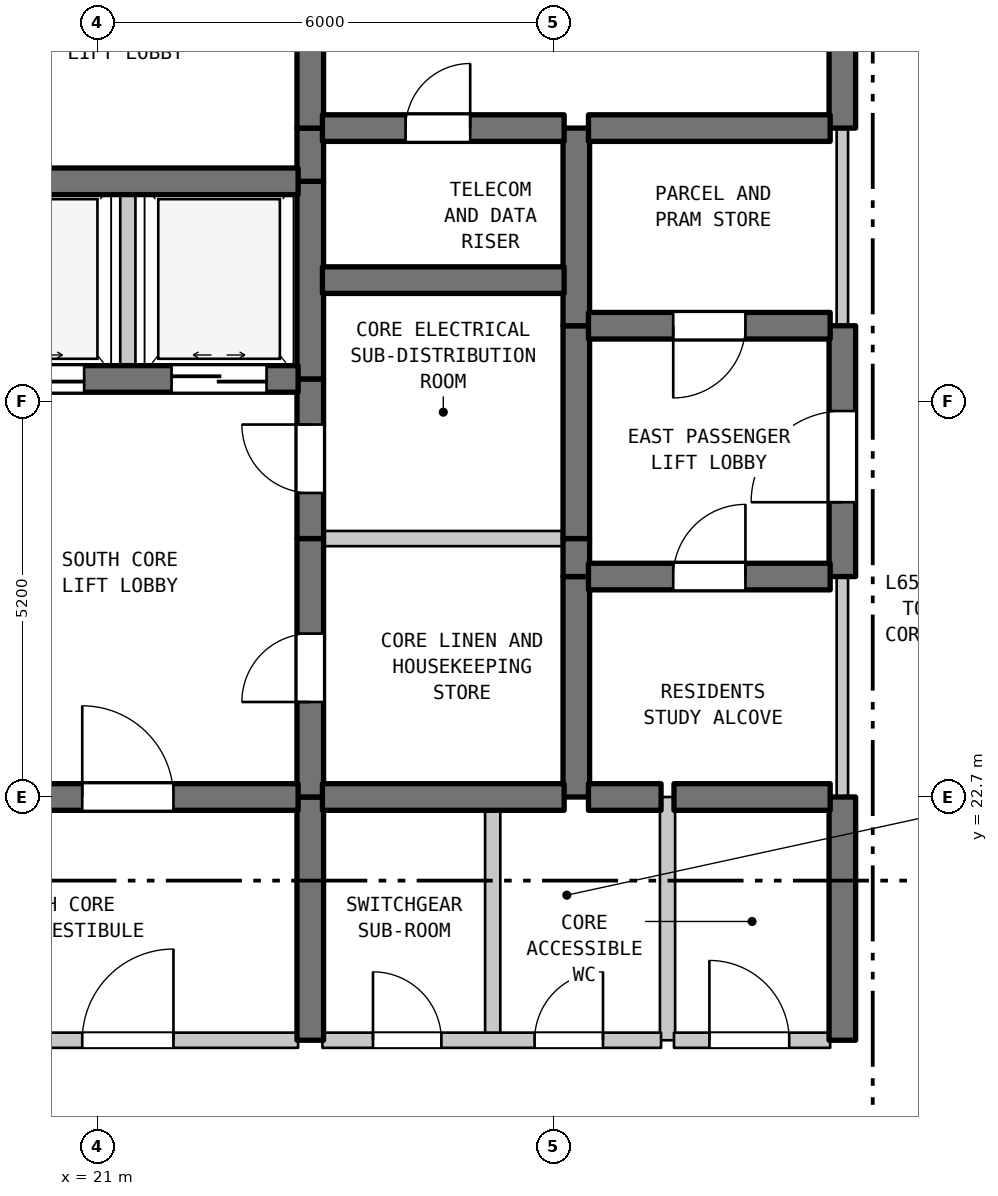
"""IFC4 building model, lengths in metres.
Left out: names, types, materials, properties, quantities, classifications, styles, units other than length and angle.
Written with IfcOpenShell. Run it as: python <this file> out.ifc"""

import sys

from ifc_helpers import new_model, si_unit, direction, frame, frame_2d, origin, place, context, subcontext, project, spatial, rectangle, extrude, element, fill, save


model = new_model("IFC4")
c1 = context("Model", 3, precision=1e-05, world=origin(), true_north=direction((0.0, 1.0)))
c2 = subcontext(c1, "Body", "Model", "MODEL_VIEW")
j1 = project(units=[si_unit("LENGTHUNIT", "METRE"), si_unit("PLANEANGLEUNIT", "RADIAN")], contexts=[c1])
p1 = place(None, origin())
s1 = spatial("IfcSite", under=j1, at=p1, CompositionType="ELEMENT")
p2 = place(p1, origin())
s2 = spatial("IfcBuilding", under=s1, at=p2, CompositionType="ELEMENT")
p3 = place(p2, frame((0.0, 0.0, 262.1)))
s3 = spatial("IfcBuildingStorey", under=s2, at=p3, CompositionType="ELEMENT", Elevation=262.1)
p4 = place(p3, frame((21.4, 28.2, 0.0), z_axis=(0.0, 0.0, 1.0), x_axis=(0.0, 1.0, 0.0)))
e1 = element("IfcWall", 1, at=p4, inside=s3, PredefinedType="STANDARD", context=c2, shape_type="SweptSolid", body=[
    extrude(rectangle(XDim=2.6, YDim=0.2, at=frame_2d((1.3, 0.0))), origin(), (0.0, 0.0, 1.0), 3.39),
])
p5 = place(p3, frame((23.8, 19.5, 0.0), z_axis=(0.0, 0.0, 1.0), x_axis=(0.0, 1.0, 0.0)))
e2 = element("IfcWall", 2, at=p5, inside=s3, PredefinedType="SHEAR", context=c2, shape_type="SweptSolid", body=[
    extrude(rectangle(XDim=3.2, YDim=0.35, at=frame_2d((1.6, 0.0))), origin(), (0.0, 0.0, 1.0), 3.39),
])
p6 = place(p3, frame((23.8, 22.7, 0.0), z_axis=(0.0, 0.0, 1.0), x_axis=(0.0, 1.0, 0.0)))
e3 = element("IfcWall", 3, at=p6, inside=s3, PredefinedType="SHEAR", context=c2, shape_type="SweptSolid", body=[
    extrude(rectangle(XDim=3.4, YDim=0.35, at=frame_2d((1.7, 0.0))), origin(), (0.0, 0.0, 1.0), 3.39),
])
p7 = place(p6, frame((1.25, 0.0, 0.0)))
e4 = element("IfcOpeningElement", 4, at=p7, cuts=e3, PredefinedType="OPENING", context=c2, shape_type="SweptSolid", body=[
    extrude(rectangle(XDim=0.9, YDim=2.15, at=frame_2d((0.45, 1.075))), frame((0.0, 0.185, 0.0), z_axis=(0.0, -1.0, 0.0), x_axis=(1.0, 0.0, 0.0)), (0.0, 0.0, 1.0), 0.37),
])
p8 = place(p3, frame((23.8, 26.1, 0.0), z_axis=(0.0, 0.0, 1.0), x_axis=(0.0, 1.0, 0.0)))
e5 = element("IfcWall", 5, at=p8, inside=s3, PredefinedType="SHEAR", context=c2, shape_type="SweptSolid", body=[
    extrude(rectangle(XDim=2.1, YDim=0.35, at=frame_2d((1.05, 0.0))), origin(), (0.0, 0.0, 1.0), 3.39),
])
p9 = place(p8, frame((0.6, 0.0, 0.0)))
e6 = element("IfcOpeningElement", 6, at=p9, cuts=e5, PredefinedType="OPENING", context=c2, shape_type="SweptSolid", body=[
    extrude(rectangle(XDim=0.9, YDim=2.15, at=frame_2d((0.45, 1.075))), frame((0.0, 0.185, 0.0), z_axis=(0.0, -1.0, 0.0), x_axis=(1.0, 0.0, 0.0)), (0.0, 0.0, 1.0), 0.37),
])
p10 = place(p3, frame((23.8, 28.2, 0.0), z_axis=(0.0, 0.0, 1.0), x_axis=(0.0, 1.0, 0.0)))
e7 = element("IfcWall", 7, at=p10, inside=s3, PredefinedType="SHEAR", context=c2, shape_type="SweptSolid", body=[
    extrude(rectangle(XDim=2.6, YDim=0.35, at=frame_2d((1.3, 0.0))), origin(), (0.0, 0.0, 1.0), 3.39),
])
p11 = place(p3, frame((23.8, 30.8, 0.0), z_axis=(0.0, 0.0, 1.0), x_axis=(0.0, 1.0, 0.0)))
e8 = element("IfcWall", 8, at=p11, inside=s3, PredefinedType="SHEAR", context=c2, shape_type="SweptSolid", body=[
    extrude(rectangle(XDim=0.7, YDim=0.35, at=frame_2d((0.35, 0.0))), origin(), (0.0, 0.0, 1.0), 3.39),
])
p12 = place(p3, frame((23.8, 31.5, 0.0), z_axis=(0.0, 0.0, 1.0), x_axis=(0.0, 1.0, 0.0)))
e9 = element("IfcWall", 9, at=p12, inside=s3, PredefinedType="SHEAR", context=c2, shape_type="SweptSolid", body=[
    extrude(rectangle(XDim=3.5, YDim=0.35, at=frame_2d((1.75, 0.0))), origin(), (0.0, 0.0, 1.0), 3.39),
])
p13 = place(p12, frame((1.127, 0.0, 0.0)))
e10 = element("IfcOpeningElement", 10, at=p13, cuts=e9, PredefinedType="OPENING", context=c2, shape_type="SweptSolid", body=[
    extrude(rectangle(XDim=1.1, YDim=2.15, at=frame_2d((0.55, 1.075))), frame((0.0, 0.185, 0.0), z_axis=(0.0, -1.0, 0.0), x_axis=(1.0, 0.0, 0.0)), (0.0, 0.0, 1.0), 0.37),
])
p14 = place(p3, frame((26.2, 19.5, 0.0), z_axis=(0.0, 0.0, 1.0), x_axis=(0.0, 1.0, 0.0)))
e11 = element("IfcWall", 11, at=p14, inside=s3, PredefinedType="STANDARD", context=c2, shape_type="SweptSolid", body=[
    extrude(rectangle(XDim=3.2, YDim=0.2, at=frame_2d((1.6, 0.0))), origin(), (0.0, 0.0, 1.0), 3.39),
])
p15 = place(p3, frame((27.3, 22.7, 0.0), z_axis=(0.0, 0.0, 1.0), x_axis=(0.0, 1.0, 0.0)))
e12 = element("IfcWall", 12, at=p15, inside=s3, PredefinedType="SHEAR", context=c2, shape_type="SweptSolid", body=[
    extrude(rectangle(XDim=2.9, YDim=0.35, at=frame_2d((1.45, 0.0))), origin(), (0.0, 0.0, 1.0), 3.39),
])
p16 = place(p3, frame((27.3, 25.6, 0.0), z_axis=(0.0, 0.0, 1.0), x_axis=(0.0, 1.0, 0.0)))
e13 = element("IfcWall", 13, at=p16, inside=s3, PredefinedType="SHEAR", context=c2, shape_type="SweptSolid", body=[
    extrude(rectangle(XDim=0.5, YDim=0.35, at=frame_2d((0.25, 0.0))), origin(), (0.0, 0.0, 1.0), 3.39),
])
p17 = place(p3, frame((27.3, 26.1, 0.0), z_axis=(0.0, 0.0, 1.0), x_axis=(0.0, 1.0, 0.0)))
e14 = element("IfcWall", 14, at=p17, inside=s3, PredefinedType="SHEAR", context=c2, shape_type="SweptSolid", body=[
    extrude(rectangle(XDim=2.8, YDim=0.35, at=frame_2d((1.4, 0.0))), origin(), (0.0, 0.0, 1.0), 3.39),
])
p18 = place(p3, frame((27.3, 28.9, 0.0), z_axis=(0.0, 0.0, 1.0), x_axis=(0.0, 1.0, 0.0)))
e15 = element("IfcWall", 15, at=p18, inside=s3, PredefinedType="SHEAR", context=c2, shape_type="SweptSolid", body=[
    extrude(rectangle(XDim=2.6, YDim=0.35, at=frame_2d((1.3, 0.0))), origin(), (0.0, 0.0, 1.0), 3.39),
])
p19 = place(p3, frame((28.5, 19.5, 0.0), z_axis=(0.0, 0.0, 1.0), x_axis=(0.0, 1.0, 0.0)))
e16 = element("IfcWall", 16, at=p19, inside=s3, PredefinedType="STANDARD", context=c2, shape_type="SweptSolid", body=[
    extrude(rectangle(XDim=3.2, YDim=0.2, at=frame_2d((1.6, 0.0))), origin(), (0.0, 0.0, 1.0), 3.39),
])
p20 = place(p3, frame((30.8, 19.5, 0.0), z_axis=(0.0, 0.0, 1.0), x_axis=(0.0, 1.0, 0.0)))
e17 = element("IfcWall", 17, at=p20, inside=s3, PredefinedType="SHEAR", context=c2, shape_type="SweptSolid", body=[
    extrude(rectangle(XDim=3.2, YDim=0.35, at=frame_2d((1.6, 0.0))), origin(), (0.0, 0.0, 1.0), 3.39),
])
p21 = place(p3, frame((30.8, 22.7, 0.0), z_axis=(0.0, 0.0, 1.0), x_axis=(0.0, 1.0, 0.0)))
e18 = element("IfcWall", 18, at=p21, inside=s3, PredefinedType="STANDARD", context=c2, shape_type="SweptSolid", body=[
    extrude(rectangle(XDim=2.9, YDim=0.15, at=frame_2d((1.45, 0.0))), origin(), (0.0, 0.0, 1.0), 3.39),
])
p22 = place(p3, frame((30.8, 25.6, 0.0), z_axis=(0.0, 0.0, 1.0), x_axis=(0.0, 1.0, 0.0)))
e19 = element("IfcWall", 19, at=p22, inside=s3, PredefinedType="SHEAR", context=c2, shape_type="SweptSolid", body=[
    extrude(rectangle(XDim=3.3, YDim=0.35, at=frame_2d((1.65, 0.0))), origin(), (0.0, 0.0, 1.0), 3.39),
])
p23 = place(p22, frame((0.978, 0.0, 0.0)))
e20 = element("IfcOpeningElement", 20, at=p23, cuts=e19, PredefinedType="OPENING", context=c2, shape_type="SweptSolid", body=[
    extrude(rectangle(XDim=1.2, YDim=2.2, at=frame_2d((0.6, 1.1))), frame((0.0, 0.185, 0.0), z_axis=(0.0, -1.0, 0.0), x_axis=(1.0, 0.0, 0.0)), (0.0, 0.0, 1.0), 0.37),
])
p24 = place(p3, frame((30.8, 28.9, 0.0), z_axis=(0.0, 0.0, 1.0), x_axis=(0.0, 1.0, 0.0)))
e21 = element("IfcWall", 21, at=p24, inside=s3, PredefinedType="STANDARD", context=c2, shape_type="SweptSolid", body=[
    extrude(rectangle(XDim=2.6, YDim=0.15, at=frame_2d((1.3, 0.0))), origin(), (0.0, 0.0, 1.0), 3.39),
])
p25 = place(p3, frame((30.8, 31.5, 0.0), z_axis=(0.0, 0.0, 1.0), x_axis=(0.0, 1.0, 0.0)))
e22 = element("IfcWall", 22, at=p25, inside=s3, PredefinedType="SHEAR", context=c2, shape_type="SweptSolid", body=[
    extrude(rectangle(XDim=3.5, YDim=0.35, at=frame_2d((1.75, 0.0))), origin(), (0.0, 0.0, 1.0), 3.39),
])
p26 = place(p25, frame((1.15, 0.0, 0.0)))
e23 = element("IfcOpeningElement", 23, at=p26, cuts=e22, PredefinedType="OPENING", context=c2, shape_type="SweptSolid", body=[
    extrude(rectangle(XDim=1.2, YDim=2.2, at=frame_2d((0.6, 1.1))), frame((0.0, 0.185, 0.0), z_axis=(0.0, -1.0, 0.0), x_axis=(1.0, 0.0, 0.0)), (0.0, 0.0, 1.0), 0.37),
])
p27 = place(p3, frame((19.16, 19.5, 0.0), z_axis=(0.0, 0.0, 1.0), x_axis=(1.0, 0.0, 0.0)))
e24 = element("IfcWall", 24, at=p27, inside=s3, PredefinedType="STANDARD", context=c2, shape_type="SweptSolid", body=[
    extrude(rectangle(XDim=4.48, YDim=0.2, at=frame_2d((2.24, 0.0))), origin(), (0.0, 0.0, 1.0), 3.39),
])
p28 = place(p27, frame((1.64, 0.0, 0.0)))
e25 = element("IfcOpeningElement", 25, at=p28, cuts=e24, PredefinedType="OPENING", context=c2, shape_type="SweptSolid", body=[
    extrude(rectangle(XDim=1.2, YDim=2.2, at=frame_2d((0.6, 1.1))), frame((0.0, 0.11, 0.0), z_axis=(0.0, -1.0, 0.0), x_axis=(1.0, 0.0, 0.0)), (0.0, 0.0, 1.0), 0.22),
])
p29 = place(p3, frame((23.96, 19.5, 0.0), z_axis=(0.0, 0.0, 1.0), x_axis=(1.0, 0.0, 0.0)))
e26 = element("IfcWall", 26, at=p29, inside=s3, PredefinedType="STANDARD", context=c2, shape_type="SweptSolid", body=[
    extrude(rectangle(XDim=4.455, YDim=0.2, at=frame_2d((2.228, 0.0))), origin(), (0.0, 0.0, 1.0), 3.39),
])
p30 = place(p29, frame((0.665, 0.0, 0.0)))
e27 = element("IfcOpeningElement", 27, at=p30, cuts=e26, PredefinedType="OPENING", context=c2, shape_type="SweptSolid", body=[
    extrude(rectangle(XDim=0.9, YDim=2.15, at=frame_2d((0.45, 1.075))), frame((0.0, 0.11, 0.0), z_axis=(0.0, -1.0, 0.0), x_axis=(1.0, 0.0, 0.0)), (0.0, 0.0, 1.0), 0.22),
])
p31 = place(p29, frame((2.791, 0.0, 0.0)))
e28 = element("IfcOpeningElement", 28, at=p31, cuts=e26, PredefinedType="OPENING", context=c2, shape_type="SweptSolid", body=[
    extrude(rectangle(XDim=0.9, YDim=2.15, at=frame_2d((0.45, 1.075))), frame((0.0, 0.11, 0.0), z_axis=(0.0, -1.0, 0.0), x_axis=(1.0, 0.0, 0.0)), (0.0, 0.0, 1.0), 0.22),
])
p32 = place(p3, frame((28.585, 19.5, 0.0), z_axis=(0.0, 0.0, 1.0), x_axis=(1.0, 0.0, 0.0)))
e29 = element("IfcWall", 29, at=p32, inside=s3, PredefinedType="STANDARD", context=c2, shape_type="SweptSolid", body=[
    extrude(rectangle(XDim=2.055, YDim=0.2, at=frame_2d((1.027, 0.0))), origin(), (0.0, 0.0, 1.0), 3.39),
])
p33 = place(p32, frame((0.466, 0.0, 0.0)))
e30 = element("IfcOpeningElement", 30, at=p33, cuts=e29, PredefinedType="OPENING", context=c2, shape_type="SweptSolid", body=[
    extrude(rectangle(XDim=1.05, YDim=2.15, at=frame_2d((0.525, 1.075))), frame((0.0, 0.11, 0.0), z_axis=(0.0, -1.0, 0.0), x_axis=(1.0, 0.0, 0.0)), (0.0, 0.0, 1.0), 0.22),
])
p34 = place(p3, frame((19.16, 22.7, 0.0), z_axis=(0.0, 0.0, 1.0), x_axis=(1.0, 0.0, 0.0)))
e31 = element("IfcWall", 31, at=p34, inside=s3, PredefinedType="SHEAR", context=c2, shape_type="SweptSolid", body=[
    extrude(rectangle(XDim=4.48, YDim=0.35, at=frame_2d((2.24, 0.0))), origin(), (0.0, 0.0, 1.0), 3.39),
])
p35 = place(p34, frame((1.64, 0.0, 0.0)))
e32 = element("IfcOpeningElement", 32, at=p35, cuts=e31, PredefinedType="OPENING", context=c2, shape_type="SweptSolid", body=[
    extrude(rectangle(XDim=1.2, YDim=2.2, at=frame_2d((0.6, 1.1))), frame((0.0, 0.185, 0.0), z_axis=(0.0, -1.0, 0.0), x_axis=(1.0, 0.0, 0.0)), (0.0, 0.0, 1.0), 0.37),
])
p36 = place(p3, frame((23.96, 22.7, 0.0), z_axis=(0.0, 0.0, 1.0), x_axis=(1.0, 0.0, 0.0)))
e33 = element("IfcWall", 33, at=p36, inside=s3, PredefinedType="SHEAR", context=c2, shape_type="SweptSolid", body=[
    extrude(rectangle(XDim=3.18, YDim=0.35, at=frame_2d((1.59, 0.0))), origin(), (0.0, 0.0, 1.0), 3.39),
])
p37 = place(p3, frame((27.46, 22.7, 0.0), z_axis=(0.0, 0.0, 1.0), x_axis=(1.0, 0.0, 0.0)))
e34 = element("IfcWall", 34, at=p37, inside=s3, PredefinedType="SHEAR", context=c2, shape_type="SweptSolid", body=[
    extrude(rectangle(XDim=0.955, YDim=0.35, at=frame_2d((0.478, 0.0))), origin(), (0.0, 0.0, 1.0), 3.39),
])
p38 = place(p3, frame((28.585, 22.7, 0.0), z_axis=(0.0, 0.0, 1.0), x_axis=(1.0, 0.0, 0.0)))
e35 = element("IfcWall", 35, at=p38, inside=s3, PredefinedType="SHEAR", context=c2, shape_type="SweptSolid", body=[
    extrude(rectangle(XDim=2.055, YDim=0.35, at=frame_2d((1.027, 0.0))), origin(), (0.0, 0.0, 1.0), 3.39),
])
p39 = place(p3, frame((27.46, 25.6, 0.0), z_axis=(0.0, 0.0, 1.0), x_axis=(1.0, 0.0, 0.0)))
e36 = element("IfcWall", 36, at=p39, inside=s3, PredefinedType="SHEAR", context=c2, shape_type="SweptSolid", body=[
    extrude(rectangle(XDim=3.18, YDim=0.35, at=frame_2d((1.59, 0.0))), origin(), (0.0, 0.0, 1.0), 3.39),
])
p40 = place(p39, frame((1.115, 0.0, 0.0)))
e37 = element("IfcOpeningElement", 37, at=p40, cuts=e36, PredefinedType="OPENING", context=c2, shape_type="SweptSolid", body=[
    extrude(rectangle(XDim=0.95, YDim=2.15, at=frame_2d((0.475, 1.075))), frame((0.0, 0.185, 0.0), z_axis=(0.0, -1.0, 0.0), x_axis=(1.0, 0.0, 0.0)), (0.0, 0.0, 1.0), 0.37),
])
p41 = place(p3, frame((23.96, 26.1, 0.0), z_axis=(0.0, 0.0, 1.0), x_axis=(1.0, 0.0, 0.0)))
e38 = element("IfcWall", 38, at=p41, inside=s3, PredefinedType="STANDARD", context=c2, shape_type="SweptSolid", body=[
    extrude(rectangle(XDim=3.18, YDim=0.2, at=frame_2d((1.59, 0.0))), origin(), (0.0, 0.0, 1.0), 3.39),
])
p42 = place(p3, frame((19.16, 28.2, 0.0), z_axis=(0.0, 0.0, 1.0), x_axis=(1.0, 0.0, 0.0)))
e39 = element("IfcWall", 39, at=p42, inside=s3, PredefinedType="SHEAR", context=c2, shape_type="SweptSolid", body=[
    extrude(rectangle(XDim=4.48, YDim=0.35, at=frame_2d((2.24, 0.0))), origin(), (0.0, 0.0, 1.0), 3.39),
])
p43 = place(p42, frame((0.415, 0.0, 0.0)))
e40 = element("IfcOpeningElement", 40, at=p43, cuts=e39, PredefinedType="OPENING", context=c2, shape_type="SweptSolid", body=[
    extrude(rectangle(XDim=1.25, YDim=2.2, at=frame_2d((0.625, 1.1))), frame((0.0, 0.185, 0.0), z_axis=(0.0, -1.0, 0.0), x_axis=(1.0, 0.0, 0.0)), (0.0, 0.0, 1.0), 0.37),
])
p44 = place(p42, frame((2.815, 0.0, 0.0)))
e41 = element("IfcOpeningElement", 41, at=p44, cuts=e39, PredefinedType="OPENING", context=c2, shape_type="SweptSolid", body=[
    extrude(rectangle(XDim=1.25, YDim=2.2, at=frame_2d((0.625, 1.1))), frame((0.0, 0.185, 0.0), z_axis=(0.0, -1.0, 0.0), x_axis=(1.0, 0.0, 0.0)), (0.0, 0.0, 1.0), 0.37),
])
p45 = place(p3, frame((27.46, 28.9, 0.0), z_axis=(0.0, 0.0, 1.0), x_axis=(1.0, 0.0, 0.0)))
e42 = element("IfcWall", 42, at=p45, inside=s3, PredefinedType="SHEAR", context=c2, shape_type="SweptSolid", body=[
    extrude(rectangle(XDim=3.18, YDim=0.35, at=frame_2d((1.59, 0.0))), origin(), (0.0, 0.0, 1.0), 3.39),
])
p46 = place(p45, frame((1.115, 0.0, 0.0)))
e43 = element("IfcOpeningElement", 43, at=p46, cuts=e42, PredefinedType="OPENING", context=c2, shape_type="SweptSolid", body=[
    extrude(rectangle(XDim=0.95, YDim=2.15, at=frame_2d((0.475, 1.075))), frame((0.0, 0.185, 0.0), z_axis=(0.0, -1.0, 0.0), x_axis=(1.0, 0.0, 0.0)), (0.0, 0.0, 1.0), 0.37),
])
p47 = place(p3, frame((23.96, 29.5, 0.0), z_axis=(0.0, 0.0, 1.0), x_axis=(1.0, 0.0, 0.0)))
e44 = element("IfcWall", 44, at=p47, inside=s3, PredefinedType="SHEAR", context=c2, shape_type="SweptSolid", body=[
    extrude(rectangle(XDim=3.18, YDim=0.35, at=frame_2d((1.59, 0.0))), origin(), (0.0, 0.0, 1.0), 3.39),
])
p48 = place(p3, frame((19.16, 30.8, 0.0), z_axis=(0.0, 0.0, 1.0), x_axis=(1.0, 0.0, 0.0)))
e45 = element("IfcWall", 45, at=p48, inside=s3, PredefinedType="SHEAR", context=c2, shape_type="SweptSolid", body=[
    extrude(rectangle(XDim=4.48, YDim=0.35, at=frame_2d((2.24, 0.0))), origin(), (0.0, 0.0, 1.0), 3.39),
])
p49 = place(p3, frame((23.96, 31.5, 0.0), z_axis=(0.0, 0.0, 1.0), x_axis=(1.0, 0.0, 0.0)))
e46 = element("IfcWall", 46, at=p49, inside=s3, PredefinedType="SHEAR", context=c2, shape_type="SweptSolid", body=[
    extrude(rectangle(XDim=3.18, YDim=0.35, at=frame_2d((1.59, 0.0))), origin(), (0.0, 0.0, 1.0), 3.39),
])
p50 = place(p49, frame((1.094, 0.0, 0.0)))
e47 = element("IfcOpeningElement", 47, at=p50, cuts=e46, PredefinedType="OPENING", context=c2, shape_type="SweptSolid", body=[
    extrude(rectangle(XDim=0.85, YDim=2.1, at=frame_2d((0.425, 1.05))), frame((0.0, 0.185, 0.0), z_axis=(0.0, -1.0, 0.0), x_axis=(1.0, 0.0, 0.0)), (0.0, 0.0, 1.0), 0.37),
])
p51 = place(p3, frame((27.46, 31.5, 0.0), z_axis=(0.0, 0.0, 1.0), x_axis=(1.0, 0.0, 0.0)))
e48 = element("IfcWall", 48, at=p51, inside=s3, PredefinedType="SHEAR", context=c2, shape_type="SweptSolid", body=[
    extrude(rectangle(XDim=3.18, YDim=0.35, at=frame_2d((1.59, 0.0))), origin(), (0.0, 0.0, 1.0), 3.39),
])
p52 = place(p7, origin())
e49 = element("IfcDoor", 49, at=p52, inside=s3, OperationType="SINGLE_SWING_LEFT", PredefinedType="DOOR", context=c2, shape_type="SweptSolid", body=[
    extrude(rectangle(XDim=0.9, YDim=2.15, at=frame_2d((0.45, 1.075))), frame((0.0, 0.025, 0.0), z_axis=(0.0, -1.0, 0.0), x_axis=(1.0, 0.0, 0.0)), (0.0, 0.0, 1.0), 0.05),
])
fill(e4, e49)
p53 = place(p9, origin())
e50 = element("IfcDoor", 50, at=p53, inside=s3, OperationType="SINGLE_SWING_RIGHT", PredefinedType="DOOR", context=c2, shape_type="SweptSolid", body=[
    extrude(rectangle(XDim=0.9, YDim=2.15, at=frame_2d((0.45, 1.075))), frame((0.0, 0.025, 0.0), z_axis=(0.0, -1.0, 0.0), x_axis=(1.0, 0.0, 0.0)), (0.0, 0.0, 1.0), 0.05),
])
fill(e6, e50)
p54 = place(p23, origin())
e51 = element("IfcDoor", 51, at=p54, inside=s3, OperationType="SINGLE_SWING_LEFT", PredefinedType="DOOR", context=c2, shape_type="SweptSolid", body=[
    extrude(rectangle(XDim=1.2, YDim=2.2, at=frame_2d((0.6, 1.1))), frame((0.0, 0.025, 0.0), z_axis=(0.0, -1.0, 0.0), x_axis=(1.0, 0.0, 0.0)), (0.0, 0.0, 1.0), 0.05),
])
fill(e20, e51)
p55 = place(p28, origin())
e52 = element("IfcDoor", 52, at=p55, inside=s3, OperationType="SINGLE_SWING_RIGHT", PredefinedType="DOOR", context=c2, shape_type="SweptSolid", body=[
    extrude(rectangle(XDim=1.2, YDim=2.2, at=frame_2d((0.6, 1.1))), frame((0.0, 0.025, 0.0), z_axis=(0.0, -1.0, 0.0), x_axis=(1.0, 0.0, 0.0)), (0.0, 0.0, 1.0), 0.05),
])
fill(e25, e52)
p56 = place(p30, origin())
e53 = element("IfcDoor", 53, at=p56, inside=s3, OperationType="SINGLE_SWING_LEFT", PredefinedType="DOOR", context=c2, shape_type="SweptSolid", body=[
    extrude(rectangle(XDim=0.9, YDim=2.15, at=frame_2d((0.45, 1.075))), frame((0.0, 0.025, 0.0), z_axis=(0.0, -1.0, 0.0), x_axis=(1.0, 0.0, 0.0)), (0.0, 0.0, 1.0), 0.05),
])
fill(e27, e53)
p57 = place(p31, origin())
e54 = element("IfcDoor", 54, at=p57, inside=s3, OperationType="SINGLE_SWING_RIGHT", PredefinedType="DOOR", context=c2, shape_type="SweptSolid", body=[
    extrude(rectangle(XDim=0.9, YDim=2.15, at=frame_2d((0.45, 1.075))), frame((0.0, 0.025, 0.0), z_axis=(0.0, -1.0, 0.0), x_axis=(1.0, 0.0, 0.0)), (0.0, 0.0, 1.0), 0.05),
])
fill(e28, e54)
p58 = place(p33, origin())
e55 = element("IfcDoor", 55, at=p58, inside=s3, OperationType="SINGLE_SWING_LEFT", PredefinedType="DOOR", context=c2, shape_type="SweptSolid", body=[
    extrude(rectangle(XDim=1.05, YDim=2.15, at=frame_2d((0.525, 1.075))), frame((0.0, 0.025, 0.0), z_axis=(0.0, -1.0, 0.0), x_axis=(1.0, 0.0, 0.0)), (0.0, 0.0, 1.0), 0.05),
])
fill(e30, e55)
p59 = place(p35, origin())
e56 = element("IfcDoor", 56, at=p59, inside=s3, OperationType="SINGLE_SWING_LEFT", PredefinedType="DOOR", context=c2, shape_type="SweptSolid", body=[
    extrude(rectangle(XDim=1.2, YDim=2.2, at=frame_2d((0.6, 1.1))), frame((0.0, 0.025, 0.0), z_axis=(0.0, -1.0, 0.0), x_axis=(1.0, 0.0, 0.0)), (0.0, 0.0, 1.0), 0.05),
])
fill(e32, e56)
p60 = place(p40, origin())
e57 = element("IfcDoor", 57, at=p60, inside=s3, OperationType="SINGLE_SWING_RIGHT", PredefinedType="DOOR", context=c2, shape_type="SweptSolid", body=[
    extrude(rectangle(XDim=0.95, YDim=2.15, at=frame_2d((0.475, 1.075))), frame((0.0, 0.025, 0.0), z_axis=(0.0, -1.0, 0.0), x_axis=(1.0, 0.0, 0.0)), (0.0, 0.0, 1.0), 0.05),
])
fill(e37, e57)
p61 = place(p43, origin())
e58 = element("IfcDoor", 58, at=p61, inside=s3, OperationType="DOUBLE_DOOR_SLIDING", PredefinedType="DOOR", context=c2, shape_type="SweptSolid", body=[
    extrude(rectangle(XDim=1.25, YDim=2.2, at=frame_2d((0.625, 1.1))), frame((0.0, 0.025, 0.0), z_axis=(0.0, -1.0, 0.0), x_axis=(1.0, 0.0, 0.0)), (0.0, 0.0, 1.0), 0.05),
])
fill(e40, e58)
p62 = place(p44, origin())
e59 = element("IfcDoor", 59, at=p62, inside=s3, OperationType="DOUBLE_DOOR_SLIDING", PredefinedType="DOOR", context=c2, shape_type="SweptSolid", body=[
    extrude(rectangle(XDim=1.25, YDim=2.2, at=frame_2d((0.625, 1.1))), frame((0.0, 0.025, 0.0), z_axis=(0.0, -1.0, 0.0), x_axis=(1.0, 0.0, 0.0)), (0.0, 0.0, 1.0), 0.05),
])
fill(e41, e59)
p63 = place(p46, frame((0.95, 0.0, 0.0), z_axis=(0.0, 0.0, 1.0), x_axis=(-1.0, 0.0, 0.0)))
e60 = element("IfcDoor", 60, at=p63, inside=s3, OperationType="SINGLE_SWING_LEFT", PredefinedType="DOOR", context=c2, shape_type="SweptSolid", body=[
    extrude(rectangle(XDim=0.95, YDim=2.15, at=frame_2d((0.475, 1.075))), frame((0.0, 0.025, 0.0), z_axis=(0.0, -1.0, 0.0), x_axis=(1.0, 0.0, 0.0)), (0.0, 0.0, 1.0), 0.05),
])
fill(e43, e60)
p64 = place(p50, origin())
e61 = element("IfcDoor", 61, at=p64, inside=s3, OperationType="SINGLE_SWING_RIGHT", PredefinedType="DOOR", context=c2, shape_type="SweptSolid", body=[
    extrude(rectangle(XDim=0.85, YDim=2.1, at=frame_2d((0.425, 1.05))), frame((0.0, 0.025, 0.0), z_axis=(0.0, -1.0, 0.0), x_axis=(1.0, 0.0, 0.0)), (0.0, 0.0, 1.0), 0.05),
])
fill(e47, e61)
save(model, sys.argv[1])
